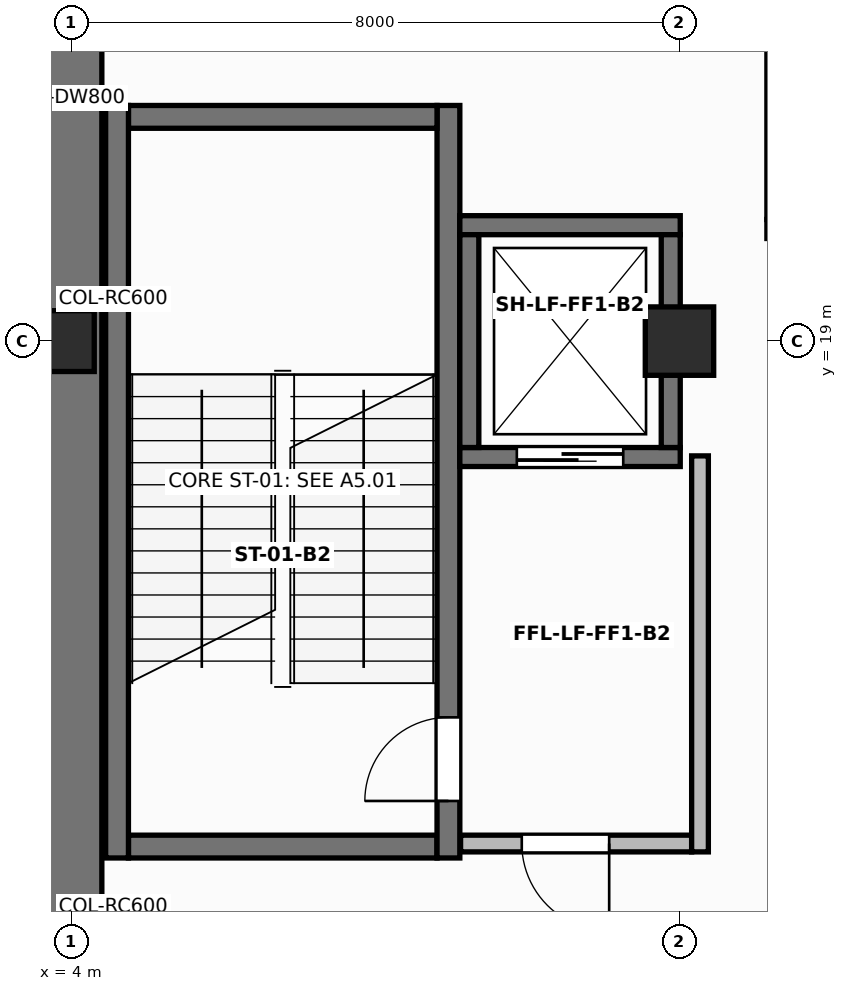
"""IFC4 building model, lengths in metres.
Left out: names, types, materials, properties, quantities, classifications, styles, units other than length and angle.
Written with IfcOpenShell. Run it as: python <this file> out.ifc"""

import sys

from ifc_helpers import new_model, si_unit, direction, frame, frame_2d, origin, origin_2d, place, context, subcontext, project, spatial, rectangle, extrude, element, fill, save


model = new_model("IFC4")
c1 = context("Model", 3, precision=1e-05, world=origin(), true_north=direction((0.0, 1.0)))
c2 = subcontext(c1, "Body", "Model", "MODEL_VIEW")
j1 = project(units=[si_unit("LENGTHUNIT", "METRE"), si_unit("PLANEANGLEUNIT", "RADIAN")], contexts=[c1])
p1 = place(None, origin())
s1 = spatial("IfcSite", under=j1, at=p1, CompositionType="ELEMENT")
p2 = place(p1, origin())
s2 = spatial("IfcBuilding", under=s1, at=p2, CompositionType="ELEMENT")
p3 = place(p2, frame((0.0, 0.0, -11.2)))
s3 = spatial("IfcBuildingStorey", under=s2, at=p3, CompositionType="ELEMENT", Elevation=-11.2)
p4 = place(p3, frame((4.0, 2.6, 0.0), z_axis=(0.0, 0.0, 1.0), x_axis=(0.0, 1.0, 0.0)))
e1 = element("IfcWall", 1, at=p4, inside=s3, PredefinedType="SOLIDWALL", context=c2, shape_type="SweptSolid", body=[
    extrude(rectangle(XDim=114.8, YDim=0.8, at=frame_2d((57.4, 0.0))), origin(), (0.0, 0.0, 1.0), 5.22),
])
p5 = place(p3, frame((4.0, 19.0, 0.0), z_axis=(0.0, 0.0, 1.0), x_axis=(1.0, 0.0, 0.0)))
e2 = element("IfcColumn", 2, at=p5, inside=s3, PredefinedType="PILASTER", context=c2, shape_type="SweptSolid", body=[
    extrude(rectangle(XDim=0.6, YDim=0.8, at=origin_2d()), origin(), (0.0, 0.0, 1.0), 5.6),
])
p6 = place(p3, frame((12.0, 19.0, 0.0), z_axis=(0.0, 0.0, 1.0), x_axis=(1.0, 0.0, 0.0)))
e3 = element("IfcColumn", 3, at=p6, inside=s3, PredefinedType="COLUMN", context=c2, shape_type="SweptSolid", body=[
    extrude(rectangle(XDim=0.9, YDim=0.9, at=origin_2d()), origin(), (0.0, 0.0, 1.0), 5.6),
])
p7 = place(p3, frame((4.75, 12.35, 0.0), z_axis=(0.0, 0.0, 1.0), x_axis=(1.0, 0.0, 0.0)))
e4 = element("IfcWall", 4, at=p7, inside=s3, PredefinedType="SHEAR", context=c2, shape_type="SweptSolid", body=[
    extrude(rectangle(XDim=4.06, YDim=0.3, at=frame_2d((2.03, 0.0))), origin(), (0.0, 0.0, 1.0), 5.235),
])
p8 = place(p3, frame((8.96, 12.2, 0.0), z_axis=(0.0, 0.0, 1.0), x_axis=(0.0, 1.0, 0.0)))
e5 = element("IfcWall", 5, at=p8, inside=s3, PredefinedType="SHEAR", context=c2, shape_type="SweptSolid", body=[
    extrude(rectangle(XDim=9.9, YDim=0.3, at=frame_2d((4.95, 0.0))), origin(), (0.0, 0.0, 1.0), 5.235),
])
p9 = place(p8, frame((0.75, 0.0, 0.0)))
e6 = element("IfcOpeningElement", 6, at=p9, cuts=e5, PredefinedType="OPENING", context=c2, shape_type="SweptSolid", body=[
    extrude(rectangle(XDim=1.1, YDim=2.15, at=frame_2d((0.55, 1.075))), frame((0.0, 0.16, 0.0), z_axis=(0.0, -1.0, 0.0), x_axis=(1.0, 0.0, 0.0)), (0.0, 0.0, 1.0), 0.32),
])
p10 = place(p3, frame((8.81, 21.95, 0.0), z_axis=(0.0, 0.0, 1.0), x_axis=(-1.0, 0.0, 0.0)))
e7 = element("IfcWall", 7, at=p10, inside=s3, PredefinedType="SHEAR", context=c2, shape_type="SweptSolid", body=[
    extrude(rectangle(XDim=4.06, YDim=0.3, at=frame_2d((2.03, 0.0))), origin(), (0.0, 0.0, 1.0), 5.235),
])
p11 = place(p3, frame((4.6, 22.1, 0.0), z_axis=(0.0, 0.0, 1.0), x_axis=(0.0, -1.0, 0.0)))
e8 = element("IfcWall", 8, at=p11, inside=s3, PredefinedType="SHEAR", context=c2, shape_type="SweptSolid", body=[
    extrude(rectangle(XDim=9.9, YDim=0.3, at=frame_2d((4.95, 0.0))), origin(), (0.0, 0.0, 1.0), 5.235),
])
p12 = place(p3, frame((9.11, 17.475, 0.0), z_axis=(0.0, 0.0, 1.0), x_axis=(1.0, 0.0, 0.0)))
e9 = element("IfcWall", 9, at=p12, inside=s3, PredefinedType="SOLIDWALL", context=c2, shape_type="SweptSolid", body=[
    extrude(rectangle(XDim=2.9, YDim=0.25, at=frame_2d((1.45, 0.0))), origin(), (0.0, 0.0, 1.0), 5.235),
])
p13 = place(p12, frame((0.75, 0.0, 0.0)))
e10 = element("IfcOpeningElement", 10, at=p13, cuts=e9, PredefinedType="OPENING", context=c2, shape_type="SweptSolid", body=[
    extrude(rectangle(XDim=1.4, YDim=2.25, at=frame_2d((0.7, 1.125))), frame((0.0, 0.135, 0.0), z_axis=(0.0, -1.0, 0.0), x_axis=(1.0, 0.0, 0.0)), (0.0, 0.0, 1.0), 0.27),
])
p14 = place(p3, frame((12.01, 20.525, 0.0), z_axis=(0.0, 0.0, 1.0), x_axis=(-1.0, 0.0, 0.0)))
e11 = element("IfcWall", 11, at=p14, inside=s3, PredefinedType="SOLIDWALL", context=c2, shape_type="SweptSolid", body=[
    extrude(rectangle(XDim=2.9, YDim=0.25, at=frame_2d((1.45, 0.0))), origin(), (0.0, 0.0, 1.0), 5.235),
])
for number, where, z_axis, x_axis in (
    (12, (11.885, 17.6, 0.0), (0.0, 0.0, 1.0), (0.0, 1.0, 0.0)),
    (13, (9.235, 20.4, 0.0), (0.0, 0.0, 1.0), (0.0, -1.0, 0.0)),
):
    element("IfcWall", number, at=place(p3, frame(where, z_axis=z_axis, x_axis=x_axis)), inside=s3, PredefinedType="SOLIDWALL", context=c2, shape_type="SweptSolid", body=[
        extrude(rectangle(XDim=2.8, YDim=0.25, at=frame_2d((1.4, 0.0))), origin(), (0.0, 0.0, 1.0), 5.235),
    ])
p15 = place(p3, frame((9.12, 12.39, 0.0), z_axis=(0.0, 0.0, 1.0), x_axis=(1.0, 0.0, 0.0)))
e14 = element("IfcWall", 14, at=p15, inside=s3, PredefinedType="SOLIDWALL", context=c2, shape_type="SweptSolid", body=[
    extrude(rectangle(XDim=3.04, YDim=0.22, at=frame_2d((1.52, 0.0))), origin(), (0.0, 0.0, 1.0), 4.435),
])
p16 = place(p15, frame((0.805, 0.0, 0.0)))
e15 = element("IfcOpeningElement", 15, at=p16, cuts=e14, PredefinedType="OPENING", context=c2, shape_type="SweptSolid", body=[
    extrude(rectangle(XDim=1.15, YDim=2.15, at=frame_2d((0.575, 1.075))), frame((0.0, 0.12, 0.0), z_axis=(0.0, -1.0, 0.0), x_axis=(1.0, 0.0, 0.0)), (0.0, 0.0, 1.0), 0.24),
])
p17 = place(p3, frame((12.27, 12.28, 0.0), z_axis=(0.0, 0.0, 1.0), x_axis=(0.0, 1.0, 0.0)))
e16 = element("IfcWall", 16, at=p17, inside=s3, PredefinedType="SOLIDWALL", context=c2, shape_type="SweptSolid", body=[
    extrude(rectangle(XDim=5.21, YDim=0.22, at=frame_2d((2.605, 0.0))), origin(), (0.0, 0.0, 1.0), 4.435),
])
p18 = place(p3, frame((13.15, 20.475, 0.0), z_axis=(0.0, 0.0, 1.0), x_axis=(1.0, 0.0, 0.0)))
e17 = element("IfcWall", 17, at=p18, inside=s3, PredefinedType="SOLIDWALL", context=c2, shape_type="SweptSolid", body=[
    extrude(rectangle(XDim=3.1, YDim=0.25, at=frame_2d((1.55, 0.0))), origin(), (0.0, 0.0, 1.0), 5.235),
])
p19 = place(p18, frame((0.95, 0.0, 0.0)))
e18 = element("IfcOpeningElement", 18, at=p19, cuts=e17, PredefinedType="OPENING", context=c2, shape_type="SweptSolid", body=[
    extrude(rectangle(XDim=1.2, YDim=2.2, at=frame_2d((0.6, 1.1))), frame((0.0, 0.135, 0.0), z_axis=(0.0, -1.0, 0.0), x_axis=(1.0, 0.0, 0.0)), (0.0, 0.0, 1.0), 0.27),
])
p20 = place(p3, frame((13.275, 23.5, 0.0), z_axis=(0.0, 0.0, 1.0), x_axis=(0.0, -1.0, 0.0)))
e19 = element("IfcWall", 19, at=p20, inside=s3, PredefinedType="SOLIDWALL", context=c2, shape_type="SweptSolid", body=[
    extrude(rectangle(XDim=2.9, YDim=0.25, at=frame_2d((1.45, 0.0))), origin(), (0.0, 0.0, 1.0), 5.235),
])
p21 = place(p9, origin())
e20 = element("IfcDoor", 20, at=p21, inside=s3, OperationType="SINGLE_SWING_LEFT", PredefinedType="DOOR", context=c2, shape_type="SweptSolid", body=[
    extrude(rectangle(XDim=1.1, YDim=2.15, at=frame_2d((0.55, 1.075))), frame((0.0, 0.025, 0.0), z_axis=(0.0, -1.0, 0.0), x_axis=(1.0, 0.0, 0.0)), (0.0, 0.0, 1.0), 0.05),
])
fill(e6, e20)
p22 = place(p13, frame((1.4, 0.0, 0.0), z_axis=(0.0, 0.0, 1.0), x_axis=(-1.0, 0.0, 0.0)))
e21 = element("IfcDoor", 21, at=p22, inside=s3, OperationType="DOUBLE_DOOR_SLIDING", PredefinedType="DOOR", context=c2, shape_type="SweptSolid", body=[
    extrude(rectangle(XDim=1.4, YDim=2.25, at=frame_2d((0.7, 1.125))), frame((0.0, 0.025, 0.0), z_axis=(0.0, -1.0, 0.0), x_axis=(1.0, 0.0, 0.0)), (0.0, 0.0, 1.0), 0.05),
])
fill(e10, e21)
p23 = place(p16, frame((1.15, 0.0, 0.0), z_axis=(0.0, 0.0, 1.0), x_axis=(-1.0, 0.0, 0.0)))
e22 = element("IfcDoor", 22, at=p23, inside=s3, OperationType="SINGLE_SWING_RIGHT", PredefinedType="DOOR", context=c2, shape_type="SweptSolid", body=[
    extrude(rectangle(XDim=1.15, YDim=2.15, at=frame_2d((0.575, 1.075))), frame((0.0, 0.025, 0.0), z_axis=(0.0, -1.0, 0.0), x_axis=(1.0, 0.0, 0.0)), (0.0, 0.0, 1.0), 0.05),
])
fill(e15, e22)
save(model, sys.argv[1])
